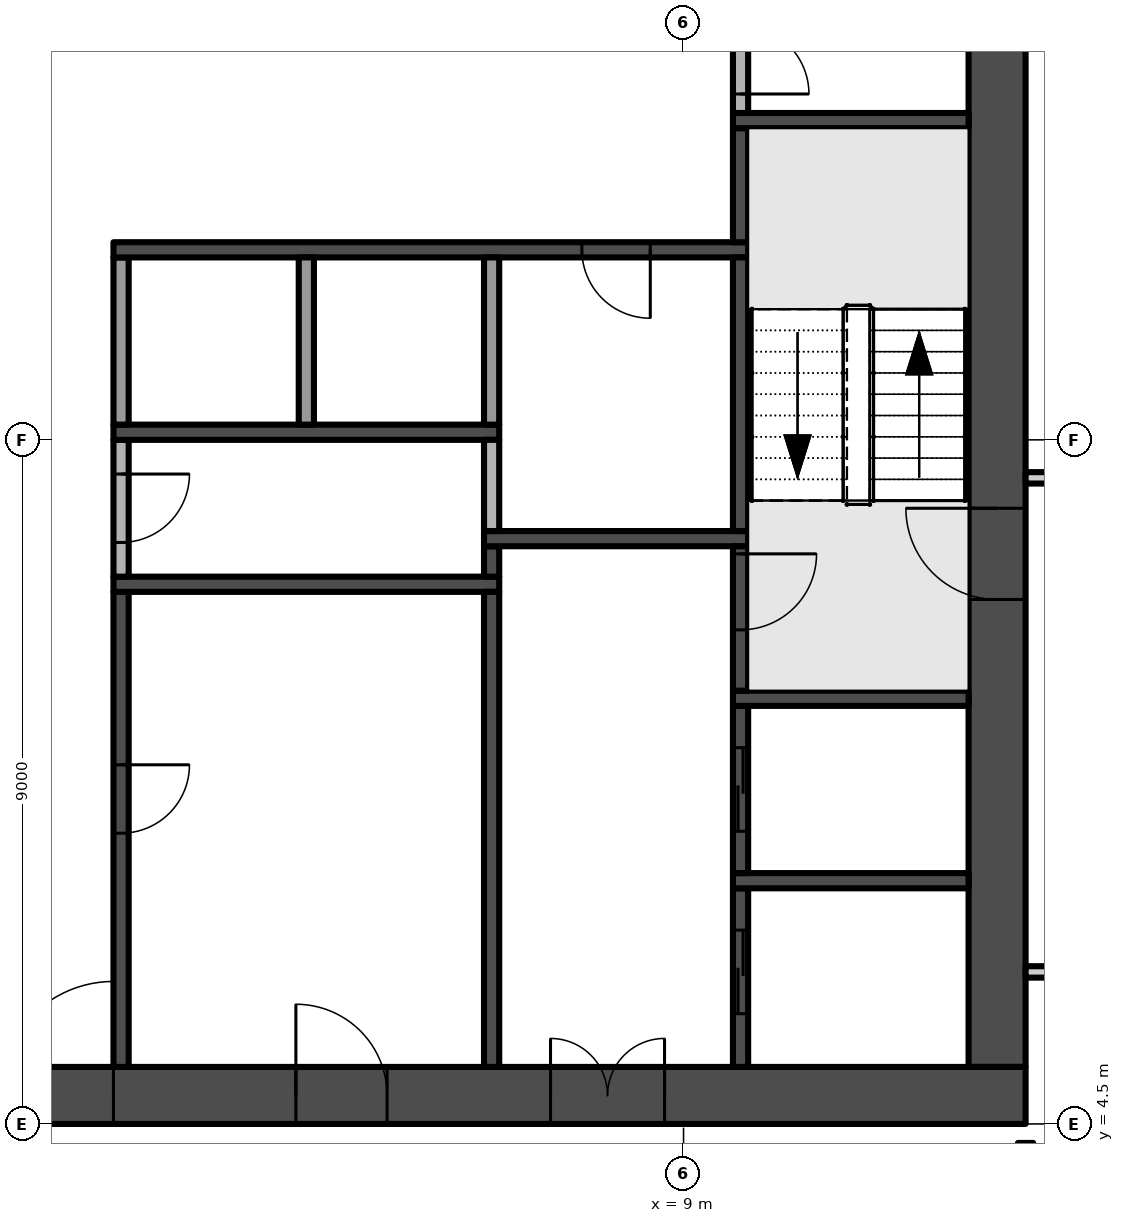
"""IFC4 building model, lengths in metres.
Left out: names, types, materials, properties, quantities, classifications, styles, units other than length and angle.
Written with IfcOpenShell. Run it as: python <this file> out.ifc"""

import sys

from ifc_helpers import new_model, si_unit, direction, frame, frame_2d, origin, place, context, subcontext, project, spatial, rectangle, extrude, element, fill, save


model = new_model("IFC4")
c1 = context("Model", 3, precision=1e-05, world=origin(), true_north=direction((0.0, 1.0)))
c2 = subcontext(c1, "Body", "Model", "MODEL_VIEW")
j1 = project(units=[si_unit("LENGTHUNIT", "METRE"), si_unit("PLANEANGLEUNIT", "RADIAN")], contexts=[c1])
p1 = place(None, origin())
s1 = spatial("IfcSite", under=j1, at=p1, CompositionType="ELEMENT")
p2 = place(p1, origin())
s2 = spatial("IfcBuilding", under=s1, at=p2, CompositionType="ELEMENT")
p3 = place(p2, frame((0.0, 0.0, 115.0)))
s3 = spatial("IfcBuildingStorey", under=s2, at=p3, CompositionType="ELEMENT", Elevation=115.0)
p4 = place(p3, frame((-13.5, 4.875, -0.3), z_axis=(0.0, 0.0, 1.0), x_axis=(1.0, 0.0, 0.0)))
e1 = element("IfcWall", 1, at=p4, inside=s3, PredefinedType="SHEAR", context=c2, shape_type="SweptSolid", body=[
    extrude(rectangle(XDim=27.0, YDim=0.75, at=frame_2d((13.5, 0.0))), origin(), (0.0, 0.0, 1.0), 5.0),
])
p5 = place(p4, frame((12.0, 0.0, 0.3)))
e2 = element("IfcOpeningElement", 2, at=p5, cuts=e1, PredefinedType="OPENING", context=c2, shape_type="SweptSolid", body=[
    extrude(rectangle(XDim=3.0, YDim=2.4, at=frame_2d((1.5, 1.2))), frame((0.0, 0.385, 0.0), z_axis=(0.0, -1.0, 0.0), x_axis=(1.0, 0.0, 0.0)), (0.0, 0.0, 1.0), 0.77),
])
p6 = place(p4, frame((4.9, 0.0, 0.3)))
e3 = element("IfcOpeningElement", 3, at=p6, cuts=e1, PredefinedType="OPENING", context=c2, shape_type="SweptSolid", body=[
    extrude(rectangle(XDim=1.2, YDim=2.2, at=frame_2d((0.6, 1.1))), frame((0.0, 0.385, 0.0), z_axis=(0.0, -1.0, 0.0), x_axis=(1.0, 0.0, 0.0)), (0.0, 0.0, 1.0), 0.77),
])
p7 = place(p4, frame((20.75, 0.0, 0.3)))
e4 = element("IfcOpeningElement", 4, at=p7, cuts=e1, PredefinedType="OPENING", context=c2, shape_type="SweptSolid", body=[
    extrude(rectangle(XDim=1.5, YDim=2.2, at=frame_2d((0.75, 1.1))), frame((0.0, 0.385, 0.0), z_axis=(0.0, -1.0, 0.0), x_axis=(1.0, 0.0, 0.0)), (0.0, 0.0, 1.0), 0.77),
])
p8 = place(p4, frame((17.4, 0.0, 0.3)))
e5 = element("IfcOpeningElement", 5, at=p8, cuts=e1, PredefinedType="OPENING", context=c2, shape_type="SweptSolid", body=[
    extrude(rectangle(XDim=1.2, YDim=2.2, at=frame_2d((0.6, 1.1))), frame((0.0, 0.385, 0.0), z_axis=(0.0, -1.0, 0.0), x_axis=(1.0, 0.0, 0.0)), (0.0, 0.0, 1.0), 0.77),
])
p9 = place(p3, frame((13.125, 5.25, -0.3), z_axis=(0.0, 0.0, 1.0), x_axis=(0.0, 1.0, 0.0)))
e6 = element("IfcWall", 6, at=p9, inside=s3, PredefinedType="SHEAR", context=c2, shape_type="SweptSolid", body=[
    extrude(rectangle(XDim=16.5, YDim=0.75, at=frame_2d((8.25, 0.0))), origin(), (0.0, 0.0, 1.0), 5.0),
])
p10 = place(p9, frame((6.15, 0.0, 0.3)))
e7 = element("IfcOpeningElement", 7, at=p10, cuts=e6, PredefinedType="OPENING", context=c2, shape_type="SweptSolid", body=[
    extrude(rectangle(XDim=1.2, YDim=2.2, at=frame_2d((0.6, 1.1))), frame((0.0, 0.385, 0.0), z_axis=(0.0, -1.0, 0.0), x_axis=(1.0, 0.0, 0.0)), (0.0, 0.0, 1.0), 0.77),
])
p11 = place(p3, frame((1.6, 11.5, 0.0), z_axis=(0.0, 0.0, 1.0), x_axis=(0.0, -1.0, 0.0)))
e8 = element("IfcWall", 8, at=p11, inside=s3, PredefinedType="SHEAR", context=c2, shape_type="SweptSolid", body=[
    extrude(rectangle(XDim=6.25, YDim=0.2, at=frame_2d((3.125, 0.0))), origin(), (0.0, 0.0, 1.0), 4.7),
])
p12 = place(p11, frame((2.275, 0.0, 0.0)))
e9 = element("IfcOpeningElement", 9, at=p12, cuts=e8, PredefinedType="OPENING", context=c2, shape_type="SweptSolid", body=[
    extrude(rectangle(XDim=0.9, YDim=2.1, at=frame_2d((0.45, 1.05))), frame((0.0, 0.11, 0.0), z_axis=(0.0, -1.0, 0.0), x_axis=(1.0, 0.0, 0.0)), (0.0, 0.0, 1.0), 0.22),
])
p13 = place(p3, frame((1.5, 11.6, 0.0), z_axis=(0.0, 0.0, 1.0), x_axis=(1.0, 0.0, 0.0)))
e10 = element("IfcWall", 10, at=p13, inside=s3, PredefinedType="SHEAR", context=c2, shape_type="SweptSolid", body=[
    extrude(rectangle(XDim=5.075, YDim=0.2, at=frame_2d((2.538, 0.0))), origin(), (0.0, 0.0, 1.0), 4.7),
])
p14 = place(p3, frame((1.6, 13.5, 0.0), z_axis=(0.0, 0.0, 1.0), x_axis=(0.0, -1.0, 0.0)))
e11 = element("IfcWall", 11, at=p14, inside=s3, PredefinedType="PARTITIONING", context=c2, shape_type="SweptSolid", body=[
    extrude(rectangle(XDim=1.8, YDim=0.2, at=frame_2d((0.9, 0.0))), origin(), (0.0, 0.0, 1.0), 4.7),
])
p15 = place(p14, frame((0.45, 0.0, 0.0)))
e12 = element("IfcOpeningElement", 12, at=p15, cuts=e11, PredefinedType="OPENING", context=c2, shape_type="SweptSolid", body=[
    extrude(rectangle(XDim=0.9, YDim=2.1, at=frame_2d((0.45, 1.05))), frame((0.0, 0.11, 0.0), z_axis=(0.0, -1.0, 0.0), x_axis=(1.0, 0.0, 0.0)), (0.0, 0.0, 1.0), 0.22),
])
p16 = place(p3, frame((1.5, 13.6, 0.0), z_axis=(0.0, 0.0, 1.0), x_axis=(1.0, 0.0, 0.0)))
e13 = element("IfcWall", 13, at=p16, inside=s3, PredefinedType="SHEAR", context=c2, shape_type="SweptSolid", body=[
    extrude(rectangle(XDim=5.075, YDim=0.2, at=frame_2d((2.538, 0.0))), origin(), (0.0, 0.0, 1.0), 4.7),
])
p17 = place(p3, frame((1.6, 13.7, 0.0), z_axis=(0.0, 0.0, 1.0), x_axis=(0.0, 1.0, 0.0)))
e14 = element("IfcWall", 14, at=p17, inside=s3, PredefinedType="PARTITIONING", context=c2, shape_type="SweptSolid", body=[
    extrude(rectangle(XDim=2.2, YDim=0.2, at=frame_2d((1.1, 0.0))), origin(), (0.0, 0.0, 1.0), 4.7),
])
p18 = place(p3, frame((9.85, 16.0, 0.0), z_axis=(0.0, 0.0, 1.0), x_axis=(-1.0, 0.0, 0.0)))
e15 = element("IfcWall", 15, at=p18, inside=s3, PredefinedType="SHEAR", context=c2, shape_type="SweptSolid", body=[
    extrude(rectangle(XDim=8.35, YDim=0.2, at=frame_2d((4.175, 0.0))), origin(), (0.0, 0.0, 1.0), 4.7),
])
p19 = place(p18, frame((1.288, 0.0, 0.0)))
e16 = element("IfcOpeningElement", 16, at=p19, cuts=e15, PredefinedType="OPENING", context=c2, shape_type="SweptSolid", body=[
    extrude(rectangle(XDim=0.9, YDim=2.1, at=frame_2d((0.45, 1.05))), frame((0.0, 0.11, 0.0), z_axis=(0.0, -1.0, 0.0), x_axis=(1.0, 0.0, 0.0)), (0.0, 0.0, 1.0), 0.22),
])
p20 = place(p3, frame((4.037, 13.7, 0.0), z_axis=(0.0, 0.0, 1.0), x_axis=(0.0, 1.0, 0.0)))
e17 = element("IfcWall", 17, at=p20, inside=s3, PredefinedType="PARTITIONING", context=c2, shape_type="SweptSolid", body=[
    extrude(rectangle(XDim=2.2, YDim=0.2, at=frame_2d((1.1, 0.0))), origin(), (0.0, 0.0, 1.0), 4.7),
])
p21 = place(p3, frame((6.475, 5.25, 0.0), z_axis=(0.0, 0.0, 1.0), x_axis=(0.0, 1.0, 0.0)))
e18 = element("IfcWall", 18, at=p21, inside=s3, PredefinedType="SHEAR", context=c2, shape_type="SweptSolid", body=[
    extrude(rectangle(XDim=6.25, YDim=0.2, at=frame_2d((3.125, 0.0))), origin(), (0.0, 0.0, 1.0), 4.7),
])
p22 = place(p3, frame((6.475, 11.7, 0.0), z_axis=(0.0, 0.0, 1.0), x_axis=(0.0, 1.0, 0.0)))
e19 = element("IfcWall", 19, at=p22, inside=s3, PredefinedType="SHEAR", context=c2, shape_type="SweptSolid", body=[
    extrude(rectangle(XDim=0.4, YDim=0.2, at=frame_2d((0.2, 0.0))), origin(), (0.0, 0.0, 1.0), 4.7),
])
p23 = place(p3, frame((6.375, 12.2, 0.0), z_axis=(0.0, 0.0, 1.0), x_axis=(1.0, 0.0, 0.0)))
e20 = element("IfcWall", 20, at=p23, inside=s3, PredefinedType="SHEAR", context=c2, shape_type="SweptSolid", body=[
    extrude(rectangle(XDim=3.475, YDim=0.2, at=frame_2d((1.738, 0.0))), origin(), (0.0, 0.0, 1.0), 4.7),
])
p24 = place(p3, frame((6.475, 12.3, 0.0), z_axis=(0.0, 0.0, 1.0), x_axis=(0.0, 1.0, 0.0)))
e21 = element("IfcWall", 21, at=p24, inside=s3, PredefinedType="PARTITIONING", context=c2, shape_type="SweptSolid", body=[
    extrude(rectangle(XDim=1.2, YDim=0.2, at=frame_2d((0.6, 0.0))), origin(), (0.0, 0.0, 1.0), 4.7),
])
p25 = place(p3, frame((6.475, 13.7, 0.0), z_axis=(0.0, 0.0, 1.0), x_axis=(0.0, 1.0, 0.0)))
e22 = element("IfcWall", 22, at=p25, inside=s3, PredefinedType="PARTITIONING", context=c2, shape_type="SweptSolid", body=[
    extrude(rectangle(XDim=2.2, YDim=0.2, at=frame_2d((1.1, 0.0))), origin(), (0.0, 0.0, 1.0), 4.7),
])
p26 = place(p3, frame((9.75, 5.25, 0.0), z_axis=(0.0, 0.0, 1.0), x_axis=(0.0, 1.0, 0.0)))
e23 = element("IfcWall", 23, at=p26, inside=s3, PredefinedType="SHEAR", context=c2, shape_type="SweptSolid", body=[
    extrude(rectangle(XDim=2.35, YDim=0.2, at=frame_2d((1.175, 0.0))), origin(), (0.0, 0.0, 1.0), 4.7),
])
p27 = place(p26, frame((0.7, 0.0, 0.0)))
e24 = element("IfcOpeningElement", 24, at=p27, cuts=e23, PredefinedType="OPENING", context=c2, shape_type="SweptSolid", body=[
    extrude(rectangle(XDim=1.1, YDim=2.1, at=frame_2d((0.55, 1.05))), frame((0.0, 0.11, 0.0), z_axis=(0.0, -1.0, 0.0), x_axis=(1.0, 0.0, 0.0)), (0.0, 0.0, 1.0), 0.22),
])
p28 = place(p3, frame((9.65, 7.7, 0.0), z_axis=(0.0, 0.0, 1.0), x_axis=(1.0, 0.0, 0.0)))
e25 = element("IfcWall", 25, at=p28, inside=s3, PredefinedType="SHEAR", context=c2, shape_type="SweptSolid", body=[
    extrude(rectangle(XDim=3.1, YDim=0.2, at=frame_2d((1.55, 0.0))), origin(), (0.0, 0.0, 1.0), 4.7),
])
p29 = place(p3, frame((9.75, 7.8, 0.0), z_axis=(0.0, 0.0, 1.0), x_axis=(0.0, 1.0, 0.0)))
e26 = element("IfcWall", 26, at=p29, inside=s3, PredefinedType="SHEAR", context=c2, shape_type="SweptSolid", body=[
    extrude(rectangle(XDim=2.2, YDim=0.2, at=frame_2d((1.1, 0.0))), origin(), (0.0, 0.0, 1.0), 4.7),
])
p30 = place(p29, frame((0.55, 0.0, 0.0)))
e27 = element("IfcOpeningElement", 27, at=p30, cuts=e26, PredefinedType="OPENING", context=c2, shape_type="SweptSolid", body=[
    extrude(rectangle(XDim=1.1, YDim=2.1, at=frame_2d((0.55, 1.05))), frame((0.0, 0.11, 0.0), z_axis=(0.0, -1.0, 0.0), x_axis=(1.0, 0.0, 0.0)), (0.0, 0.0, 1.0), 0.22),
])
p31 = place(p3, frame((9.65, 10.1, 0.0), z_axis=(0.0, 0.0, 1.0), x_axis=(1.0, 0.0, 0.0)))
e28 = element("IfcWall", 28, at=p31, inside=s3, PredefinedType="SHEAR", context=c2, shape_type="SweptSolid", body=[
    extrude(rectangle(XDim=3.1, YDim=0.2, at=frame_2d((1.55, 0.0))), origin(), (0.0, 0.0, 1.0), 4.7),
])
p32 = place(p3, frame((9.75, 12.1, 0.0), z_axis=(0.0, 0.0, 1.0), x_axis=(0.0, -1.0, 0.0)))
e29 = element("IfcWall", 29, at=p32, inside=s3, PredefinedType="SHEAR", context=c2, shape_type="SweptSolid", body=[
    extrude(rectangle(XDim=1.9, YDim=0.2, at=frame_2d((0.95, 0.0))), origin(), (0.0, 0.0, 1.0), 4.7),
])
p33 = place(p32, frame((0.1, 0.0, 0.0)))
e30 = element("IfcOpeningElement", 30, at=p33, cuts=e29, PredefinedType="OPENING", context=c2, shape_type="SweptSolid", body=[
    extrude(rectangle(XDim=1.0, YDim=2.2, at=frame_2d((0.5, 1.1))), frame((0.0, 0.11, 0.0), z_axis=(0.0, -1.0, 0.0), x_axis=(1.0, 0.0, 0.0)), (0.0, 0.0, 1.0), 0.22),
])
p34 = place(p3, frame((9.75, 12.3, 0.0), z_axis=(0.0, 0.0, 1.0), x_axis=(0.0, 1.0, 0.0)))
e31 = element("IfcWall", 31, at=p34, inside=s3, PredefinedType="SHEAR", context=c2, shape_type="SweptSolid", body=[
    extrude(rectangle(XDim=3.6, YDim=0.2, at=frame_2d((1.8, 0.0))), origin(), (0.0, 0.0, 1.0), 4.7),
])
p35 = place(p3, frame((9.75, 16.1, 0.0), z_axis=(0.0, 0.0, 1.0), x_axis=(0.0, 1.0, 0.0)))
e32 = element("IfcWall", 32, at=p35, inside=s3, PredefinedType="SHEAR", context=c2, shape_type="SweptSolid", body=[
    extrude(rectangle(XDim=1.5, YDim=0.2, at=frame_2d((0.75, 0.0))), origin(), (0.0, 0.0, 1.0), 4.7),
])
p36 = place(p3, frame((9.65, 17.7, 0.0), z_axis=(0.0, 0.0, 1.0), x_axis=(1.0, 0.0, 0.0)))
e33 = element("IfcWall", 33, at=p36, inside=s3, PredefinedType="SHEAR", context=c2, shape_type="SweptSolid", body=[
    extrude(rectangle(XDim=3.1, YDim=0.2, at=frame_2d((1.55, 0.0))), origin(), (0.0, 0.0, 1.0), 4.7),
])
p37 = place(p3, frame((9.75, 19.2, 0.0), z_axis=(0.0, 0.0, 1.0), x_axis=(0.0, -1.0, 0.0)))
e34 = element("IfcWall", 34, at=p37, inside=s3, PredefinedType="PARTITIONING", context=c2, shape_type="SweptSolid", body=[
    extrude(rectangle(XDim=1.4, YDim=0.2, at=frame_2d((0.7, 0.0))), origin(), (0.0, 0.0, 1.0), 4.7),
])
p38 = place(p37, frame((0.25, 0.0, 0.0)))
e35 = element("IfcOpeningElement", 35, at=p38, cuts=e34, PredefinedType="OPENING", context=c2, shape_type="SweptSolid", body=[
    extrude(rectangle(XDim=0.9, YDim=2.1, at=frame_2d((0.45, 1.05))), frame((0.0, 0.11, 0.0), z_axis=(0.0, -1.0, 0.0), x_axis=(1.0, 0.0, 0.0)), (0.0, 0.0, 1.0), 0.22),
])
p39 = place(p3, frame((13.5, 6.5, 0.0), z_axis=(0.0, 0.0, 1.0), x_axis=(1.0, 0.0, 0.0)))
e36 = element("IfcWall", 36, at=p39, inside=s3, PredefinedType="PARTITIONING", context=c2, shape_type="SweptSolid", body=[
    extrude(rectangle(XDim=3.925, YDim=0.15, at=frame_2d((1.962, 0.0))), origin(), (0.0, 0.0, 1.0), 4.7),
])
p40 = place(p3, frame((13.5, 13.0, 0.0), z_axis=(0.0, 0.0, 1.0), x_axis=(1.0, 0.0, 0.0)))
e37 = element("IfcWall", 37, at=p40, inside=s3, PredefinedType="PARTITIONING", context=c2, shape_type="SweptSolid", body=[
    extrude(rectangle(XDim=3.825, YDim=0.15, at=frame_2d((1.913, 0.0))), origin(), (0.0, 0.0, 1.0), 4.7),
])
p41 = place(p5, frame((3.0, 0.0, 0.0), z_axis=(0.0, 0.0, 1.0), x_axis=(-1.0, 0.0, 0.0)))
e38 = element("IfcDoor", 38, at=p41, inside=s3, OperationType="DOUBLE_DOOR_SINGLE_SWING", PredefinedType="DOOR", context=c2, shape_type="SweptSolid", body=[
    extrude(rectangle(XDim=3.0, YDim=2.4, at=frame_2d((1.5, 1.2))), frame((0.0, 0.025, 0.0), z_axis=(0.0, -1.0, 0.0), x_axis=(1.0, 0.0, 0.0)), (0.0, 0.0, 1.0), 0.05),
])
fill(e2, e38)
p42 = place(p10, frame((1.2, 0.0, 0.0), z_axis=(0.0, 0.0, 1.0), x_axis=(-1.0, 0.0, 0.0)))
e39 = element("IfcDoor", 39, at=p42, inside=s3, OperationType="SINGLE_SWING_LEFT", PredefinedType="DOOR", context=c2, shape_type="SweptSolid", body=[
    extrude(rectangle(XDim=1.2, YDim=2.2, at=frame_2d((0.6, 1.1))), frame((0.0, 0.025, 0.0), z_axis=(0.0, -1.0, 0.0), x_axis=(1.0, 0.0, 0.0)), (0.0, 0.0, 1.0), 0.05),
])
fill(e7, e39)
p43 = place(p7, frame((1.5, 0.0, 0.0), z_axis=(0.0, 0.0, 1.0), x_axis=(-1.0, 0.0, 0.0)))
e40 = element("IfcDoor", 40, at=p43, inside=s3, OperationType="DOUBLE_DOOR_SINGLE_SWING", PredefinedType="DOOR", context=c2, shape_type="SweptSolid", body=[
    extrude(rectangle(XDim=1.5, YDim=2.2, at=frame_2d((0.75, 1.1))), frame((0.0, 0.025, 0.0), z_axis=(0.0, -1.0, 0.0), x_axis=(1.0, 0.0, 0.0)), (0.0, 0.0, 1.0), 0.05),
])
fill(e4, e40)
p44 = place(p8, frame((1.2, 0.0, 0.0), z_axis=(0.0, 0.0, 1.0), x_axis=(-1.0, 0.0, 0.0)))
e41 = element("IfcDoor", 41, at=p44, inside=s3, OperationType="SINGLE_SWING_RIGHT", PredefinedType="DOOR", context=c2, shape_type="SweptSolid", body=[
    extrude(rectangle(XDim=1.2, YDim=2.2, at=frame_2d((0.6, 1.1))), frame((0.0, 0.025, 0.0), z_axis=(0.0, -1.0, 0.0), x_axis=(1.0, 0.0, 0.0)), (0.0, 0.0, 1.0), 0.05),
])
fill(e5, e41)
p45 = place(p33, origin())
e42 = element("IfcDoor", 42, at=p45, inside=s3, OperationType="SINGLE_SWING_LEFT", PredefinedType="DOOR", context=c2, shape_type="SweptSolid", body=[
    extrude(rectangle(XDim=1.0, YDim=2.2, at=frame_2d((0.5, 1.1))), frame((0.0, 0.025, 0.0), z_axis=(0.0, -1.0, 0.0), x_axis=(1.0, 0.0, 0.0)), (0.0, 0.0, 1.0), 0.05),
])
fill(e30, e42)
p46 = place(p27, origin())
e43 = element("IfcDoor", 43, at=p46, inside=s3, OperationType="SLIDING_TO_RIGHT", PredefinedType="DOOR", context=c2, shape_type="SweptSolid", body=[
    extrude(rectangle(XDim=1.1, YDim=2.1, at=frame_2d((0.55, 1.05))), frame((0.0, 0.025, 0.0), z_axis=(0.0, -1.0, 0.0), x_axis=(1.0, 0.0, 0.0)), (0.0, 0.0, 1.0), 0.05),
])
fill(e24, e43)
p47 = place(p30, origin())
e44 = element("IfcDoor", 44, at=p47, inside=s3, OperationType="SLIDING_TO_RIGHT", PredefinedType="DOOR", context=c2, shape_type="SweptSolid", body=[
    extrude(rectangle(XDim=1.1, YDim=2.1, at=frame_2d((0.55, 1.05))), frame((0.0, 0.025, 0.0), z_axis=(0.0, -1.0, 0.0), x_axis=(1.0, 0.0, 0.0)), (0.0, 0.0, 1.0), 0.05),
])
fill(e27, e44)
p48 = place(p12, origin())
e45 = element("IfcDoor", 45, at=p48, inside=s3, OperationType="SINGLE_SWING_LEFT", PredefinedType="DOOR", context=c2, shape_type="SweptSolid", body=[
    extrude(rectangle(XDim=0.9, YDim=2.1, at=frame_2d((0.45, 1.05))), frame((0.0, 0.025, 0.0), z_axis=(0.0, -1.0, 0.0), x_axis=(1.0, 0.0, 0.0)), (0.0, 0.0, 1.0), 0.05),
])
fill(e9, e45)
p49 = place(p15, origin())
e46 = element("IfcDoor", 46, at=p49, inside=s3, OperationType="SINGLE_SWING_LEFT", PredefinedType="DOOR", context=c2, shape_type="SweptSolid", body=[
    extrude(rectangle(XDim=0.9, YDim=2.1, at=frame_2d((0.45, 1.05))), frame((0.0, 0.025, 0.0), z_axis=(0.0, -1.0, 0.0), x_axis=(1.0, 0.0, 0.0)), (0.0, 0.0, 1.0), 0.05),
])
fill(e12, e46)
p50 = place(p19, origin())
e47 = element("IfcDoor", 47, at=p50, inside=s3, OperationType="SINGLE_SWING_LEFT", PredefinedType="DOOR", context=c2, shape_type="SweptSolid", body=[
    extrude(rectangle(XDim=0.9, YDim=2.1, at=frame_2d((0.45, 1.05))), frame((0.0, 0.025, 0.0), z_axis=(0.0, -1.0, 0.0), x_axis=(1.0, 0.0, 0.0)), (0.0, 0.0, 1.0), 0.05),
])
fill(e16, e47)
p51 = place(p38, origin())
e48 = element("IfcDoor", 48, at=p51, inside=s3, OperationType="SINGLE_SWING_RIGHT", PredefinedType="DOOR", context=c2, shape_type="SweptSolid", body=[
    extrude(rectangle(XDim=0.9, YDim=2.1, at=frame_2d((0.45, 1.05))), frame((0.0, 0.025, 0.0), z_axis=(0.0, -1.0, 0.0), x_axis=(1.0, 0.0, 0.0)), (0.0, 0.0, 1.0), 0.05),
])
fill(e35, e48)
save(model, sys.argv[1])
